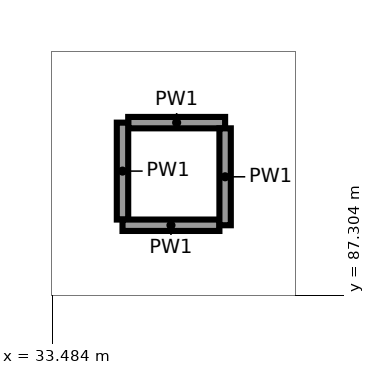
"""IFC4 building model, lengths in metres.
Left out: names, types, materials, properties, quantities, classifications, styles, units other than length and angle.
Written with IfcOpenShell. Run it as: python <this file> out.ifc"""

import sys

from ifc_helpers import new_model, si_unit, direction, frame, frame_2d, origin, origin_2d, place, context, subcontext, project, spatial, rectangle, circle, extrude, element, save


model = new_model("IFC4")
c1 = context("Model", 3, precision=1e-05, world=origin(), true_north=direction((0.0, 1.0)))
c2 = subcontext(c1, "Body", "Model", "MODEL_VIEW")
j1 = project(units=[si_unit("LENGTHUNIT", "METRE"), si_unit("PLANEANGLEUNIT", "RADIAN")], contexts=[c1])
p1 = place(None, origin())
s1 = spatial("IfcSite", under=j1, at=p1, CompositionType="ELEMENT")
p2 = place(p1, origin())
s2 = spatial("IfcBuilding", under=s1, at=p2, CompositionType="ELEMENT")
p3 = place(p2, frame((0.0, 0.0, 6.5)))
s3 = spatial("IfcBuildingStorey", under=s2, at=p3, CompositionType="ELEMENT", Elevation=6.5)
p4 = place(p3, frame((32.944, 90.551, 0.0), z_axis=(0.0, 0.0, 1.0), x_axis=(1.0, 0.0, 0.0)))
e1 = element("IfcColumn", 1, at=p4, inside=s3, PredefinedType="COLUMN", context=c2, shape_type="SweptSolid", body=[
    extrude(circle(Radius=0.55, at=origin_2d()), origin(), (0.0, 0.0, 1.0), 5.5),
])
p5 = place(p3, frame((35.758, 89.576, 0.0), z_axis=(0.0, 0.0, 1.0), x_axis=(-1.0, 0.0, 0.0)))
e2 = element("IfcWall", 2, at=p5, inside=s3, PredefinedType="PARTITIONING", context=c2, shape_type="SweptSolid", body=[
    extrude(rectangle(XDim=1.275, YDim=0.15, at=frame_2d((0.637, 0.0))), origin(), (0.0, 0.0, 1.0), 5.15),
])
for number, where, z_axis, x_axis in (
    (3, (34.408, 89.576, 0.0), (0.0, 0.0, 1.0), (0.0, -1.0, 0.0)),
    (4, (34.408, 88.226, 0.0), (0.0, 0.0, 1.0), (1.0, 0.0, 0.0)),
    (5, (35.758, 88.226, 0.0), (0.0, 0.0, 1.0), (0.0, 1.0, 0.0)),
):
    element("IfcWall", number, at=place(p3, frame(where, z_axis=z_axis, x_axis=x_axis)), inside=s3, PredefinedType="PARTITIONING", context=c2, shape_type="SweptSolid", body=[
        extrude(rectangle(XDim=1.275, YDim=0.15, at=frame_2d((0.638, 0.0))), origin(), (0.0, 0.0, 1.0), 5.15),
    ])
save(model, sys.argv[1])
